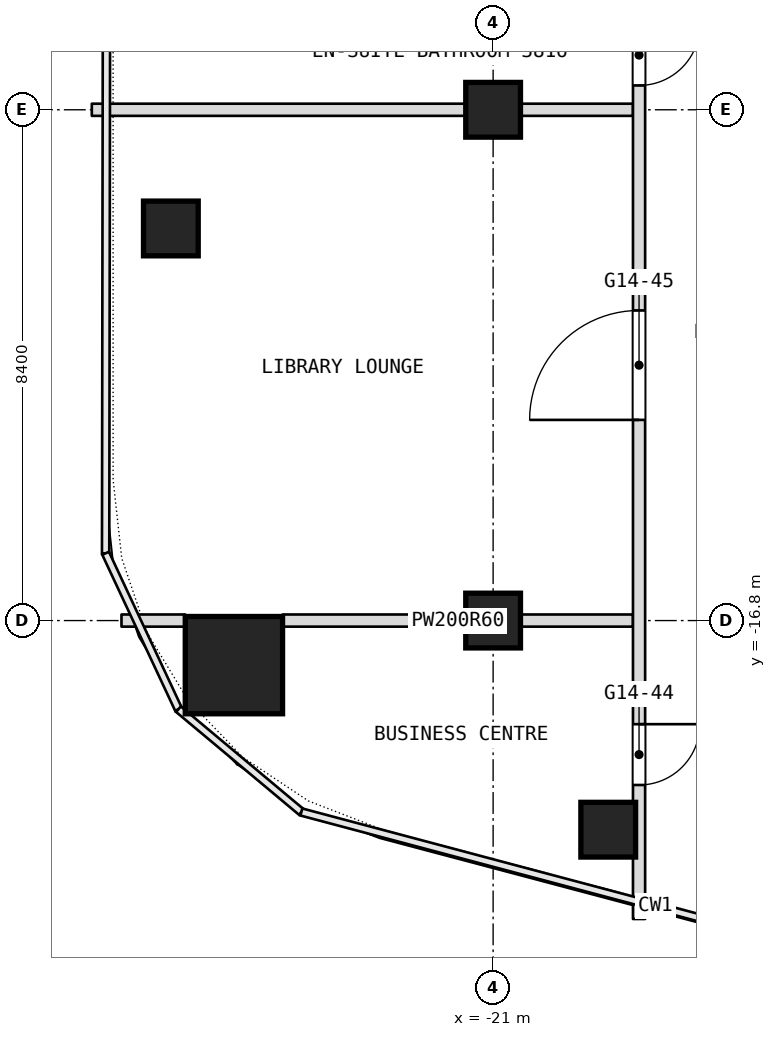
"""IFC4 building model, lengths in metres.
Left out: names, types, materials, properties, quantities, classifications, styles, units other than length and angle.
Written with IfcOpenShell. Run it as: python <this file> out.ifc"""

import sys

from ifc_helpers import new_model, si_unit, direction, frame, frame_2d, origin, origin_2d, place, context, subcontext, project, spatial, rectangle, extrude, element, fill, save


model = new_model("IFC4")
c1 = context("Model", 3, precision=1e-05, world=origin(), true_north=direction((0.0, 1.0)))
c2 = subcontext(c1, "Body", "Model", "MODEL_VIEW")
j1 = project(units=[si_unit("LENGTHUNIT", "METRE"), si_unit("PLANEANGLEUNIT", "RADIAN")], contexts=[c1])
p1 = place(None, origin())
s1 = spatial("IfcSite", under=j1, at=p1, CompositionType="ELEMENT")
p2 = place(p1, origin())
s2 = spatial("IfcBuilding", under=s1, at=p2, CompositionType="ELEMENT")
p3 = place(p2, frame((0.0, 0.0, 162.5)))
s3 = spatial("IfcBuildingStorey", under=s2, at=p3, CompositionType="ELEMENT", Elevation=162.5)
p4 = place(p3, frame((-25.263, -17.533, 0.0), z_axis=(0.0, 0.0, 1.0), x_axis=(1.0, 0.0, 0.0)))
e1 = element("IfcColumn", 1, at=p4, inside=s3, PredefinedType="COLUMN", context=c2, shape_type="SweptSolid", body=[
    extrude(rectangle(XDim=1.6, YDim=1.6, at=origin_2d()), origin(), (0.0, 0.0, 1.0), 3.6),
])
for number, where, z_axis, x_axis in (
    (2, (-21.0, -16.8, 0.0), (0.0, 0.0, 1.0), (1.0, 0.0, 0.0)),
    (3, (-21.0, -8.4, 0.0), (0.0, 0.0, 1.0), (1.0, 0.0, 0.0)),
    (4, (-26.3, -10.352, 0.0), (0.0, 0.0, 1.0), (1.0, 0.0, 0.0)),
    (5, (-19.107, -20.239, 0.0), (0.0, 0.0, 1.0), (1.0, 0.0, 0.0)),
):
    element("IfcColumn", number, at=place(p3, frame(where, z_axis=z_axis, x_axis=x_axis)), inside=s3, PredefinedType="COLUMN", context=c2, shape_type="SweptSolid", body=[
        extrude(rectangle(XDim=0.9, YDim=0.9, at=origin_2d()), origin(), (0.0, 0.0, 1.0), 3.6),
    ])
p5 = place(p3, frame((-27.112, -16.8, 0.0), z_axis=(0.0, 0.0, 1.0), x_axis=(1.0, 0.0, 0.0)))
e6 = element("IfcWall", 6, at=p5, inside=s3, PredefinedType="PARTITIONING", context=c2, shape_type="SweptSolid", body=[
    extrude(rectangle(XDim=1.049, YDim=0.2, at=frame_2d((0.524, 0.0))), origin(), (0.0, 0.0, 1.0), 3.34),
])
p6 = place(p3, frame((-24.463, -16.8, 0.0), z_axis=(0.0, 0.0, 1.0), x_axis=(1.0, 0.0, 0.0)))
e7 = element("IfcWall", 7, at=p6, inside=s3, PredefinedType="PARTITIONING", context=c2, shape_type="SweptSolid", body=[
    extrude(rectangle(XDim=5.763, YDim=0.2, at=frame_2d((2.881, 0.0))), origin(), (0.0, 0.0, 1.0), 2.89),
])
p7 = place(p3, frame((-27.6, -8.4, 0.0), z_axis=(0.0, 0.0, 1.0), x_axis=(1.0, 0.0, 0.0)))
e8 = element("IfcWall", 8, at=p7, inside=s3, PredefinedType="PARTITIONING", context=c2, shape_type="SweptSolid", body=[
    extrude(rectangle(XDim=8.9, YDim=0.2, at=frame_2d((4.45, 0.0))), origin(), (0.0, 0.0, 1.0), 2.89),
])
p8 = place(p3, frame((-18.6, -21.708, 0.0), z_axis=(0.0, 0.0, 1.0), x_axis=(0.0, 1.0, 0.0)))
e9 = element("IfcWall", 9, at=p8, inside=s3, PredefinedType="PARTITIONING", context=c2, shape_type="SweptSolid", body=[
    extrude(rectangle(XDim=28.608, YDim=0.2, at=frame_2d((14.304, 0.0))), origin(), (0.0, 0.0, 1.0), 3.34),
])
p9 = place(p8, frame((2.204, 0.0, 0.0)))
e10 = element("IfcOpeningElement", 10, at=p9, cuts=e9, PredefinedType="OPENING", context=c2, shape_type="SweptSolid", body=[
    extrude(rectangle(XDim=1.0, YDim=2.1, at=frame_2d((0.5, 1.05))), frame((0.0, 0.1, 0.0), z_axis=(0.0, -1.0, 0.0), x_axis=(1.0, 0.0, 0.0)), (0.0, 0.0, 1.0), 0.2),
])
p10 = place(p8, frame((8.208, 0.0, 0.0)))
e11 = element("IfcOpeningElement", 11, at=p10, cuts=e9, PredefinedType="OPENING", context=c2, shape_type="SweptSolid", body=[
    extrude(rectangle(XDim=1.8, YDim=2.1, at=frame_2d((0.9, 1.05))), frame((0.0, 0.1, 0.0), z_axis=(0.0, -1.0, 0.0), x_axis=(1.0, 0.0, 0.0)), (0.0, 0.0, 1.0), 0.2),
])
p11 = place(p8, frame((13.708, 0.0, 0.0)))
e12 = element("IfcOpeningElement", 12, at=p11, cuts=e9, PredefinedType="OPENING", context=c2, shape_type="SweptSolid", body=[
    extrude(rectangle(XDim=1.0, YDim=2.1, at=frame_2d((0.5, 1.05))), frame((0.0, 0.1, 0.0), z_axis=(0.0, -1.0, 0.0), x_axis=(1.0, 0.0, 0.0)), (0.0, 0.0, 1.0), 0.2),
])
p12 = place(p8, frame((20.308, 0.0, 0.0)))
e13 = element("IfcOpeningElement", 13, at=p12, cuts=e9, PredefinedType="OPENING", context=c2, shape_type="SweptSolid", body=[
    extrude(rectangle(XDim=1.0, YDim=2.1, at=frame_2d((0.5, 1.05))), frame((0.0, 0.1, 0.0), z_axis=(0.0, -1.0, 0.0), x_axis=(1.0, 0.0, 0.0)), (0.0, 0.0, 1.0), 0.2),
])
p13 = place(p9, origin())
e14 = element("IfcDoor", 14, at=p13, inside=s3, OperationType="SINGLE_SWING_RIGHT", PredefinedType="DOOR", context=c2, shape_type="SweptSolid", body=[
    extrude(rectangle(XDim=1.0, YDim=2.1, at=frame_2d((0.5, 1.05))), frame((0.0, 0.025, 0.0), z_axis=(0.0, -1.0, 0.0), x_axis=(1.0, 0.0, 0.0)), (0.0, 0.0, 1.0), 0.05),
])
fill(e10, e14)
p14 = place(p10, origin())
e15 = element("IfcDoor", 15, at=p14, inside=s3, OperationType="DOUBLE_DOOR_SINGLE_SWING", PredefinedType="DOOR", context=c2, shape_type="SweptSolid", body=[
    extrude(rectangle(XDim=1.8, YDim=2.1, at=frame_2d((0.9, 1.05))), frame((0.0, 0.025, 0.0), z_axis=(0.0, -1.0, 0.0), x_axis=(1.0, 0.0, 0.0)), (0.0, 0.0, 1.0), 0.05),
])
fill(e11, e15)
p15 = place(p11, origin())
e16 = element("IfcDoor", 16, at=p15, inside=s3, OperationType="SINGLE_SWING_LEFT", PredefinedType="DOOR", context=c2, shape_type="SweptSolid", body=[
    extrude(rectangle(XDim=1.0, YDim=2.1, at=frame_2d((0.5, 1.05))), frame((0.0, 0.025, 0.0), z_axis=(0.0, -1.0, 0.0), x_axis=(1.0, 0.0, 0.0)), (0.0, 0.0, 1.0), 0.05),
])
fill(e12, e16)
save(model, sys.argv[1])
